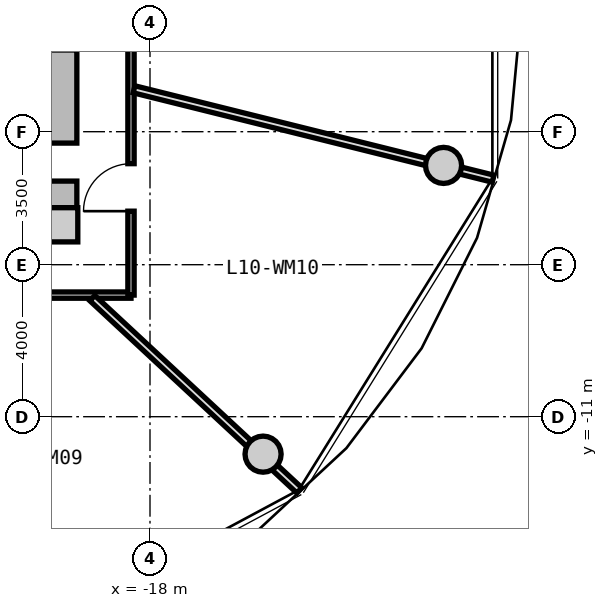
"""IFC4 building model, lengths in metres.
Left out: names, types, materials, properties, quantities, classifications, styles, units other than length and angle.
Written with IfcOpenShell. Run it as: python <this file> out.ifc"""

import sys

from ifc_helpers import new_model, si_unit, direction, frame, frame_2d, origin, origin_2d, place, context, subcontext, project, spatial, rectangle, circle, extrude, source, transform, mapped, element, fill, save


model = new_model("IFC4")
c1 = context("Model", 3, precision=1e-05, world=origin(), true_north=direction((0.0, 1.0)))
c2 = subcontext(c1, "Body", "Model", "MODEL_VIEW")
j1 = project(units=[si_unit("LENGTHUNIT", "METRE"), si_unit("PLANEANGLEUNIT", "RADIAN")], contexts=[c1])
p1 = place(None, origin())
s1 = spatial("IfcSite", under=j1, at=p1, CompositionType="ELEMENT")
p2 = place(p1, origin())
s2 = spatial("IfcBuilding", under=s1, at=p2, CompositionType="ELEMENT")
p3 = place(p2, frame((0.0, 0.0, 36.85)))
s3 = spatial("IfcBuildingStorey", under=s2, at=p3, CompositionType="ELEMENT", Elevation=36.85)
m1 = source(origin(), c2, "Body", "SweptSolid", [
    extrude(rectangle(XDim=0.9, YDim=0.9, at=origin_2d()), origin(), (0.0, 0.0, 1.0), 3.05),
])
p4 = place(p3, frame((-20.35, -5.95, 0.0), z_axis=(0.0, 0.0, 1.0), x_axis=(1.0, 0.0, 0.0)))
e1 = element("IfcColumn", 1, at=p4, inside=s3, PredefinedType="COLUMN", context=c2, shape_type="MappedRepresentation", body=[
    mapped(m1, transform((0.0, 0.0, 0.0), x_axis=(1.0, 0.0, 0.0), y_axis=(0.0, 1.0, 0.0), z_axis=(0.0, 0.0, 1.0), scale=1.0)),
])
m2 = source(origin(), c2, "Body", "SweptSolid", [
    extrude(rectangle(XDim=11.0, YDim=0.85, at=frame_2d((5.5, 0.0))), origin(), (0.0, 0.0, 1.0), 2.79),
])
p5 = place(p3, frame((-20.35, 5.5, 0.0), z_axis=(0.0, 0.0, 1.0), x_axis=(0.0, -1.0, 0.0)))
e2 = element("IfcWall", 2, at=p5, inside=s3, PredefinedType="SHEAR", context=c2, shape_type="MappedRepresentation", body=[
    mapped(m2, transform((0.0, 0.0, 0.0), x_axis=(1.0, 0.0, 0.0), y_axis=(0.0, 1.0, 0.0), z_axis=(0.0, 0.0, 1.0), scale=1.0)),
])
p6 = place(p5, frame((5.65, 0.0, 0.0)))
e3 = element("IfcOpeningElement", 3, at=p6, cuts=e2, PredefinedType="OPENING", context=c2, shape_type="SweptSolid", body=[
    extrude(rectangle(XDim=1.2, YDim=2.15, at=frame_2d((0.6, 1.075))), frame((0.0, 0.435, 0.0), z_axis=(0.0, -1.0, 0.0), x_axis=(1.0, 0.0, 0.0)), (0.0, 0.0, 1.0), 0.87),
])
p7 = place(p5, frame((9.3, 0.0, 0.0)))
e4 = element("IfcOpeningElement", 4, at=p7, cuts=e2, PredefinedType="OPENING", context=c2, shape_type="SweptSolid", body=[
    extrude(rectangle(XDim=1.0, YDim=2.1, at=frame_2d((0.5, 1.05))), frame((0.0, 0.435, 0.0), z_axis=(0.0, -1.0, 0.0), x_axis=(1.0, 0.0, 0.0)), (0.0, 0.0, 1.0), 0.87),
])
m3 = source(origin(), c2, "Body", "SweptSolid", [
    extrude(circle(Radius=0.475, at=origin_2d()), origin(), (0.0, 0.0, 1.0), 3.05),
])
for number, where, z_axis, x_axis in (
    (5, (-15.025, -11.985, 0.0), (0.0, 0.0, 1.0), (1.0, 0.0, 0.0)),
    (6, (-10.275, -4.387, 0.0), (0.0, 0.0, 1.0), (1.0, 0.0, 0.0)),
):
    element("IfcColumn", number, at=place(p3, frame(where, z_axis=z_axis, x_axis=x_axis)), inside=s3, PredefinedType="COLUMN", context=c2, shape_type="MappedRepresentation", body=[
        mapped(m3, transform((0.0, 0.0, 0.0), x_axis=(1.0, 0.0, 0.0), y_axis=(0.0, 1.0, 0.0), z_axis=(0.0, 0.0, 1.0), scale=1.0)),
    ])
m4 = source(origin(), c2, "Body", "SweptSolid", [
    extrude(rectangle(XDim=19.0, YDim=0.165, at=frame_2d((9.5, 0.0))), origin(), (0.0, 0.0, 1.0), 2.775),
])
p8 = place(p3, frame((-18.5, -7.8, 0.0), z_axis=(0.0, 0.0, 1.0), x_axis=(-1.0, 0.0, 0.0)))
e7 = element("IfcWall", 7, at=p8, inside=s3, PredefinedType="PARTITIONING", context=c2, shape_type="MappedRepresentation", body=[
    mapped(m4, transform((0.0, 0.0, 0.0), x_axis=(1.0, 0.0, 0.0), y_axis=(0.0, 1.0, 0.0), z_axis=(0.0, 0.0, 1.0), scale=1.0)),
])
p9 = place(p8, frame((14.244, 0.0, 0.0)))
e8 = element("IfcOpeningElement", 8, at=p9, cuts=e7, PredefinedType="OPENING", context=c2, shape_type="SweptSolid", body=[
    extrude(rectangle(XDim=1.25, YDim=2.2, at=frame_2d((0.625, 1.1))), frame((0.0, 0.093, 0.0), z_axis=(0.0, -1.0, 0.0), x_axis=(1.0, 0.0, 0.0)), (0.0, 0.0, 1.0), 0.185),
])
p10 = place(p8, frame((8.875, 0.0, 0.0)))
e9 = element("IfcOpeningElement", 9, at=p10, cuts=e7, PredefinedType="OPENING", context=c2, shape_type="SweptSolid", body=[
    extrude(rectangle(XDim=1.25, YDim=2.2, at=frame_2d((0.625, 1.1))), frame((0.0, 0.093, 0.0), z_axis=(0.0, -1.0, 0.0), x_axis=(1.0, 0.0, 0.0)), (0.0, 0.0, 1.0), 0.185),
])
p11 = place(p8, frame((3.506, 0.0, 0.0)))
e10 = element("IfcOpeningElement", 10, at=p11, cuts=e7, PredefinedType="OPENING", context=c2, shape_type="SweptSolid", body=[
    extrude(rectangle(XDim=1.25, YDim=2.2, at=frame_2d((0.625, 1.1))), frame((0.0, 0.093, 0.0), z_axis=(0.0, -1.0, 0.0), x_axis=(1.0, 0.0, 0.0)), (0.0, 0.0, 1.0), 0.185),
])
m5 = source(origin(), c2, "Body", "SweptSolid", [
    extrude(rectangle(XDim=15.6, YDim=0.165, at=frame_2d((7.8, 0.0))), origin(), (0.0, 0.0, 1.0), 2.775),
])
p12 = place(p3, frame((-18.5, 7.8, 0.0), z_axis=(0.0, 0.0, 1.0), x_axis=(0.0, -1.0, 0.0)))
e11 = element("IfcWall", 11, at=p12, inside=s3, PredefinedType="PARTITIONING", context=c2, shape_type="MappedRepresentation", body=[
    mapped(m5, transform((0.0, 0.0, 0.0), x_axis=(1.0, 0.0, 0.0), y_axis=(0.0, 1.0, 0.0), z_axis=(0.0, 0.0, 1.0), scale=1.0)),
])
p13 = place(p12, frame((12.141, 0.0, 0.0)))
e12 = element("IfcOpeningElement", 12, at=p13, cuts=e11, PredefinedType="OPENING", context=c2, shape_type="SweptSolid", body=[
    extrude(rectangle(XDim=1.25, YDim=2.2, at=frame_2d((0.625, 1.1))), frame((0.0, 0.093, 0.0), z_axis=(0.0, -1.0, 0.0), x_axis=(1.0, 0.0, 0.0)), (0.0, 0.0, 1.0), 0.185),
])
p14 = place(p12, frame((7.175, 0.0, 0.0)))
e13 = element("IfcOpeningElement", 13, at=p14, cuts=e11, PredefinedType="OPENING", context=c2, shape_type="SweptSolid", body=[
    extrude(rectangle(XDim=1.25, YDim=2.2, at=frame_2d((0.625, 1.1))), frame((0.0, 0.093, 0.0), z_axis=(0.0, -1.0, 0.0), x_axis=(1.0, 0.0, 0.0)), (0.0, 0.0, 1.0), 0.185),
])
p15 = place(p12, frame((2.826, 0.0, 0.0)))
e14 = element("IfcOpeningElement", 14, at=p15, cuts=e11, PredefinedType="OPENING", context=c2, shape_type="SweptSolid", body=[
    extrude(rectangle(XDim=1.05, YDim=2.15, at=frame_2d((0.525, 1.075))), frame((0.0, 0.093, 0.0), z_axis=(0.0, -1.0, 0.0), x_axis=(1.0, 0.0, 0.0)), (0.0, 0.0, 1.0), 0.185),
])
p16 = place(p12, frame((0.881, 0.0, 0.0)))
e15 = element("IfcOpeningElement", 15, at=p16, cuts=e11, PredefinedType="OPENING", context=c2, shape_type="SweptSolid", body=[
    extrude(rectangle(XDim=1.05, YDim=2.15, at=frame_2d((0.525, 1.075))), frame((0.0, 0.093, 0.0), z_axis=(0.0, -1.0, 0.0), x_axis=(1.0, 0.0, 0.0)), (0.0, 0.0, 1.0), 0.185),
])
m6 = source(origin(), c2, "Body", "SweptSolid", [
    extrude(rectangle(XDim=7.435, YDim=0.19, at=frame_2d((3.717, 0.0))), origin(), (0.0, 0.0, 1.0), 2.225),
])
p17 = place(p3, frame((-19.517, -7.88, 0.0), z_axis=(0.0, 0.0, 1.0), x_axis=(0.732651956848, -0.680603489652, 0.0)))
e16 = element("IfcWall", 16, at=p17, inside=s3, PredefinedType="PARTITIONING", context=c2, shape_type="MappedRepresentation", body=[
    mapped(m6, transform((0.0, 0.0, 0.0), x_axis=(1.0, 0.0, 0.0), y_axis=(0.0, 1.0, 0.0), z_axis=(0.0, 0.0, 1.0), scale=1.0)),
])
m7 = source(origin(), c2, "Body", "SweptSolid", [
    extrude(rectangle(XDim=9.737, YDim=0.19, at=frame_2d((4.869, 0.0))), origin(), (0.0, 0.0, 1.0), 2.225),
])
p18 = place(p3, frame((-18.42, -2.385, 0.0), z_axis=(0.0, 0.0, 1.0), x_axis=(0.970392716238, -0.241532557375, 0.0)))
e17 = element("IfcWall", 17, at=p18, inside=s3, PredefinedType="PARTITIONING", context=c2, shape_type="MappedRepresentation", body=[
    mapped(m7, transform((0.0, 0.0, 0.0), x_axis=(1.0, 0.0, 0.0), y_axis=(0.0, 1.0, 0.0), z_axis=(0.0, 0.0, 1.0), scale=1.0)),
])
m8 = source(origin(), c2, "Body", "SweptSolid", [
    extrude(rectangle(XDim=1.0, YDim=2.1, at=frame_2d((0.5, 1.05))), frame((0.0, 0.025, 0.0), z_axis=(0.0, -1.0, 0.0), x_axis=(1.0, 0.0, 0.0)), (0.0, 0.0, 1.0), 0.05),
])
p19 = place(p7, frame((1.0, 0.0, 0.0), z_axis=(0.0, 0.0, 1.0), x_axis=(-1.0, 0.0, 0.0)))
e18 = element("IfcDoor", 18, at=p19, inside=s3, OperationType="SINGLE_SWING_RIGHT", PredefinedType="DOOR", context=c2, shape_type="MappedRepresentation", body=[
    mapped(m8, transform((0.0, 0.0, 0.0), x_axis=(1.0, 0.0, 0.0), y_axis=(0.0, 1.0, 0.0), z_axis=(0.0, 0.0, 1.0), scale=1.0)),
])
fill(e4, e18)
m9 = source(origin(), c2, "Body", "SweptSolid", [
    extrude(rectangle(XDim=1.25, YDim=2.2, at=frame_2d((0.625, 1.1))), frame((0.0, 0.025, 0.0), z_axis=(0.0, -1.0, 0.0), x_axis=(1.0, 0.0, 0.0)), (0.0, 0.0, 1.0), 0.05),
])
p20 = place(p13, frame((1.25, 0.0, 0.0), z_axis=(0.0, 0.0, 1.0), x_axis=(-1.0, 0.0, 0.0)))
e19 = element("IfcDoor", 19, at=p20, inside=s3, OperationType="SINGLE_SWING_LEFT", PredefinedType="DOOR", context=c2, shape_type="MappedRepresentation", body=[
    mapped(m9, transform((0.0, 0.0, 0.0), x_axis=(1.0, 0.0, 0.0), y_axis=(0.0, 1.0, 0.0), z_axis=(0.0, 0.0, 1.0), scale=1.0)),
])
fill(e12, e19)
save(model, sys.argv[1])
